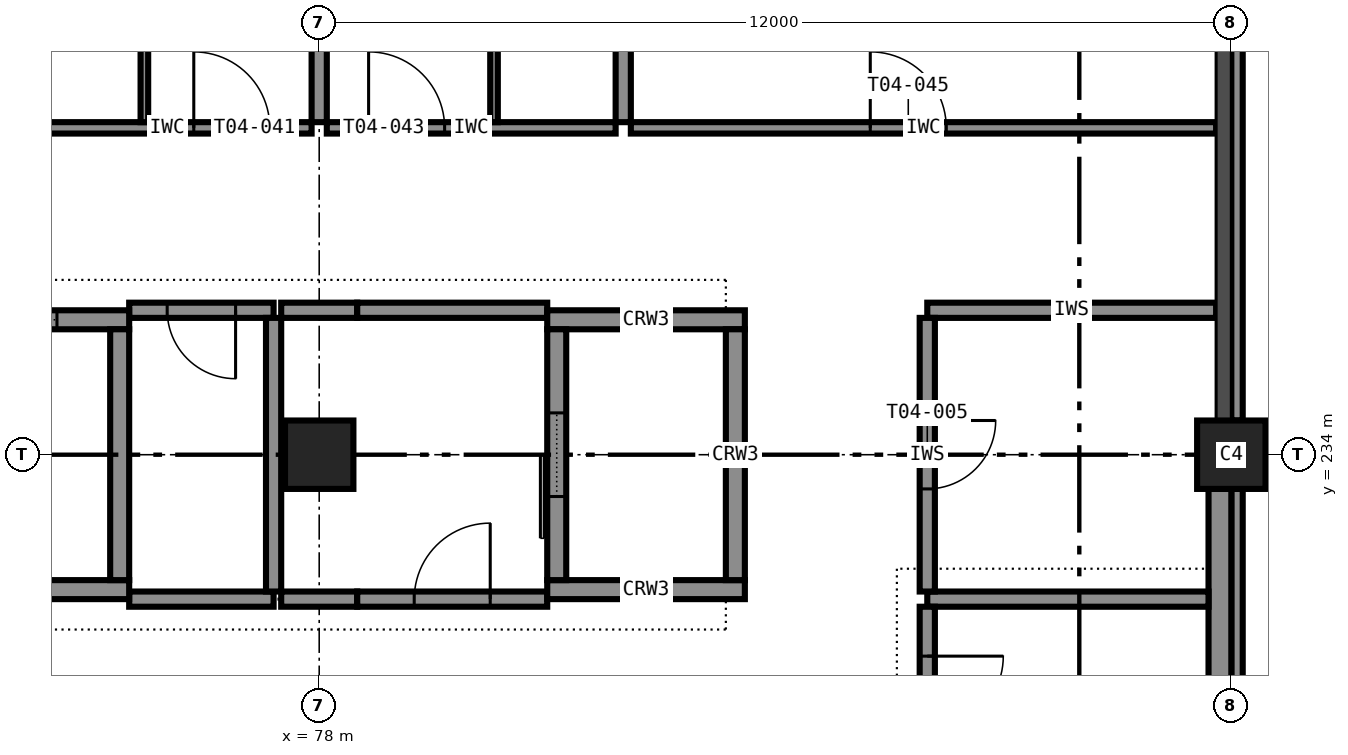
"""IFC4 building model, lengths in metres.
Left out: names, types, materials, properties, quantities, classifications, styles, units other than length and angle.
Written with IfcOpenShell. Run it as: python <this file> out.ifc"""

import sys

from ifc_helpers import new_model, si_unit, direction, frame, frame_2d, origin, origin_2d, place, context, subcontext, project, spatial, rectangle, extrude, element, fill, save


model = new_model("IFC4")
c1 = context("Model", 3, precision=1e-05, world=origin(), true_north=direction((0.0, 1.0)))
c2 = subcontext(c1, "Body", "Model", "MODEL_VIEW")
j1 = project(units=[si_unit("LENGTHUNIT", "METRE"), si_unit("PLANEANGLEUNIT", "RADIAN")], contexts=[c1])
p1 = place(None, origin())
s1 = spatial("IfcSite", under=j1, at=p1, CompositionType="ELEMENT")
p2 = place(p1, origin())
s2 = spatial("IfcBuilding", under=s1, at=p2, CompositionType="ELEMENT")
p3 = place(p2, frame((0.0, 0.0, 21.0)))
s3 = spatial("IfcBuildingStorey", under=s2, at=p3, CompositionType="ELEMENT", Elevation=21.0)
for number, where, z_axis, x_axis in (
    (1, (78.0, 234.0, 0.0), (0.0, 0.0, 1.0), (1.0, 0.0, 0.0)),
    (2, (90.0, 234.0, 0.0), (0.0, 0.0, 1.0), (1.0, 0.0, 0.0)),
):
    element("IfcColumn", number, at=place(p3, frame(where, z_axis=z_axis, x_axis=x_axis)), inside=s3, PredefinedType="COLUMN", context=c2, shape_type="SweptSolid", body=[
        extrude(rectangle(XDim=0.9, YDim=0.9, at=origin_2d()), origin(), (0.0, 0.0, 1.0), 3.6),
    ])
p4 = place(p3, frame((72.5, 232.225, 0.0), z_axis=(0.0, 0.0, 1.0), x_axis=(1.0, 0.0, 0.0)))
e3 = element("IfcWall", 3, at=p4, inside=s3, PredefinedType="SHEAR", context=c2, shape_type="SweptSolid", body=[
    extrude(rectangle(XDim=3.0, YDim=0.25, at=frame_2d((1.5, 0.0))), origin(), (0.0, 0.0, 1.0), 3.6),
])
p5 = place(p3, frame((72.5, 235.775, 0.0), z_axis=(0.0, 0.0, 1.0), x_axis=(1.0, 0.0, 0.0)))
e4 = element("IfcWall", 4, at=p5, inside=s3, PredefinedType="SHEAR", context=c2, shape_type="SweptSolid", body=[
    extrude(rectangle(XDim=3.0, YDim=0.25, at=frame_2d((1.5, 0.0))), origin(), (0.0, 0.0, 1.0), 3.6),
])
p6 = place(p5, frame((0.95, 0.0, 0.0)))
e5 = element("IfcOpeningElement", 5, at=p6, cuts=e4, PredefinedType="OPENING", context=c2, shape_type="SweptSolid", body=[
    extrude(rectangle(XDim=1.1, YDim=2.1, at=frame_2d((0.55, 1.05))), frame((0.0, 0.135, 0.0), z_axis=(0.0, -1.0, 0.0), x_axis=(1.0, 0.0, 0.0)), (0.0, 0.0, 1.0), 0.27),
])
p7 = place(p3, frame((75.375, 232.35, 0.0), z_axis=(0.0, 0.0, 1.0), x_axis=(0.0, 1.0, 0.0)))
e6 = element("IfcWall", 6, at=p7, inside=s3, PredefinedType="SHEAR", context=c2, shape_type="SweptSolid", body=[
    extrude(rectangle(XDim=3.3, YDim=0.25, at=frame_2d((1.65, 0.0))), origin(), (0.0, 0.0, 1.0), 3.6),
])
for number, where, z_axis, x_axis in (
    (7, (81.0, 232.225, 0.0), (0.0, 0.0, 1.0), (1.0, 0.0, 0.0)),
    (8, (81.0, 235.775, 0.0), (0.0, 0.0, 1.0), (1.0, 0.0, 0.0)),
):
    element("IfcWall", number, at=place(p3, frame(where, z_axis=z_axis, x_axis=x_axis)), inside=s3, PredefinedType="SHEAR", context=c2, shape_type="SweptSolid", body=[
        extrude(rectangle(XDim=2.6, YDim=0.25, at=frame_2d((1.3, 0.0))), origin(), (0.0, 0.0, 1.0), 3.6),
    ])
p8 = place(p3, frame((81.125, 232.35, 0.0), z_axis=(0.0, 0.0, 1.0), x_axis=(0.0, 1.0, 0.0)))
e9 = element("IfcWall", 9, at=p8, inside=s3, PredefinedType="SHEAR", context=c2, shape_type="SweptSolid", body=[
    extrude(rectangle(XDim=3.3, YDim=0.25, at=frame_2d((1.65, 0.0))), origin(), (0.0, 0.0, 1.0), 3.6),
])
p9 = place(p8, frame((1.1, 0.0, 0.0)))
e10 = element("IfcOpeningElement", 10, at=p9, cuts=e9, PredefinedType="OPENING", context=c2, shape_type="SweptSolid", body=[
    extrude(rectangle(XDim=1.1, YDim=2.1, at=frame_2d((0.55, 1.05))), frame((0.0, 0.135, 0.0), z_axis=(0.0, -1.0, 0.0), x_axis=(1.0, 0.0, 0.0)), (0.0, 0.0, 1.0), 0.27),
])
p10 = place(p3, frame((83.475, 232.35, 0.0), z_axis=(0.0, 0.0, 1.0), x_axis=(0.0, 1.0, 0.0)))
e11 = element("IfcWall", 11, at=p10, inside=s3, PredefinedType="SHEAR", context=c2, shape_type="SweptSolid", body=[
    extrude(rectangle(XDim=3.3, YDim=0.25, at=frame_2d((1.65, 0.0))), origin(), (0.0, 0.0, 1.0), 3.6),
])
p11 = place(p3, frame((89.85, 222.45, 0.0), z_axis=(0.0, 0.0, 1.0), x_axis=(0.0, 1.0, 0.0)))
e12 = element("IfcWall", 12, at=p11, inside=s3, PredefinedType="STANDARD", context=c2, shape_type="SweptSolid", body=[
    extrude(rectangle(XDim=11.1, YDim=0.3, at=frame_2d((5.55, 0.0))), origin(), (0.0, 0.0, 1.0), 2.6),
])
for number, where, z_axis, x_axis in (
    (13, (90.075, 222.45, 3.4), (0.0, 0.0, 1.0), (0.0, 1.0, 0.0)),
    (14, (90.075, 234.45, 3.4), (0.0, 0.0, 1.0), (0.0, 1.0, 0.0)),
):
    element("IfcWall", number, at=place(p3, frame(where, z_axis=z_axis, x_axis=x_axis)), inside=s3, PredefinedType="STANDARD", context=c2, shape_type="SweptSolid", body=[
        extrude(rectangle(XDim=11.1, YDim=0.15, at=frame_2d((5.55, 0.0))), origin(), (0.0, 0.0, 1.0), 0.2),
    ])
p12 = place(p3, frame((75.5, 232.1, 0.0), z_axis=(0.0, 0.0, 1.0), x_axis=(1.0, 0.0, 0.0)))
e15 = element("IfcWall", 15, at=p12, inside=s3, PredefinedType="PARTITIONING", context=c2, shape_type="SweptSolid", body=[
    extrude(rectangle(XDim=1.9, YDim=0.2, at=frame_2d((0.95, 0.0))), origin(), (0.0, 0.0, 1.0), 3.4),
])
p13 = place(p3, frame((77.5, 232.1, 0.0), z_axis=(0.0, 0.0, 1.0), x_axis=(1.0, 0.0, 0.0)))
e16 = element("IfcWall", 16, at=p13, inside=s3, PredefinedType="PARTITIONING", context=c2, shape_type="SweptSolid", body=[
    extrude(rectangle(XDim=1.0, YDim=0.2, at=frame_2d((0.5, 0.0))), origin(), (0.0, 0.0, 1.0), 3.4),
])
p14 = place(p3, frame((78.5, 232.1, 0.0), z_axis=(0.0, 0.0, 1.0), x_axis=(1.0, 0.0, 0.0)))
e17 = element("IfcWall", 17, at=p14, inside=s3, PredefinedType="PARTITIONING", context=c2, shape_type="SweptSolid", body=[
    extrude(rectangle(XDim=2.5, YDim=0.2, at=frame_2d((1.25, 0.0))), origin(), (0.0, 0.0, 1.0), 3.4),
])
p15 = place(p14, frame((0.75, 0.0, 0.0)))
e18 = element("IfcOpeningElement", 18, at=p15, cuts=e17, PredefinedType="OPENING", context=c2, shape_type="SweptSolid", body=[
    extrude(rectangle(XDim=1.0, YDim=2.1, at=frame_2d((0.5, 1.05))), frame((0.0, 0.11, 0.0), z_axis=(0.0, -1.0, 0.0), x_axis=(1.0, 0.0, 0.0)), (0.0, 0.0, 1.0), 0.22),
])
p16 = place(p3, frame((86.0, 232.1, 0.0), z_axis=(0.0, 0.0, 1.0), x_axis=(1.0, 0.0, 0.0)))
e19 = element("IfcWall", 19, at=p16, inside=s3, PredefinedType="PARTITIONING", context=c2, shape_type="SweptSolid", body=[
    extrude(rectangle(XDim=3.7, YDim=0.2, at=frame_2d((1.85, 0.0))), origin(), (0.0, 0.0, 1.0), 3.4),
])
p17 = place(p3, frame((77.4, 235.9, 0.0), z_axis=(0.0, 0.0, 1.0), x_axis=(-1.0, 0.0, 0.0)))
e20 = element("IfcWall", 20, at=p17, inside=s3, PredefinedType="PARTITIONING", context=c2, shape_type="SweptSolid", body=[
    extrude(rectangle(XDim=1.9, YDim=0.2, at=frame_2d((0.95, 0.0))), origin(), (0.0, 0.0, 1.0), 3.4),
])
p18 = place(p17, frame((0.5, 0.0, 0.0)))
e21 = element("IfcOpeningElement", 21, at=p18, cuts=e20, PredefinedType="OPENING", context=c2, shape_type="SweptSolid", body=[
    extrude(rectangle(XDim=0.9, YDim=2.1, at=frame_2d((0.45, 1.05))), frame((0.0, 0.11, 0.0), z_axis=(0.0, -1.0, 0.0), x_axis=(1.0, 0.0, 0.0)), (0.0, 0.0, 1.0), 0.22),
])
p19 = place(p3, frame((77.5, 235.9, 0.0), z_axis=(0.0, 0.0, 1.0), x_axis=(1.0, 0.0, 0.0)))
e22 = element("IfcWall", 22, at=p19, inside=s3, PredefinedType="PARTITIONING", context=c2, shape_type="SweptSolid", body=[
    extrude(rectangle(XDim=1.0, YDim=0.2, at=frame_2d((0.5, 0.0))), origin(), (0.0, 0.0, 1.0), 3.4),
])
p20 = place(p3, frame((78.5, 235.9, 0.0), z_axis=(0.0, 0.0, 1.0), x_axis=(1.0, 0.0, 0.0)))
e23 = element("IfcWall", 23, at=p20, inside=s3, PredefinedType="PARTITIONING", context=c2, shape_type="SweptSolid", body=[
    extrude(rectangle(XDim=2.5, YDim=0.2, at=frame_2d((1.25, 0.0))), origin(), (0.0, 0.0, 1.0), 3.4),
])
p21 = place(p3, frame((86.0, 235.9, 0.0), z_axis=(0.0, 0.0, 1.0), x_axis=(1.0, 0.0, 0.0)))
e24 = element("IfcWall", 24, at=p21, inside=s3, PredefinedType="PARTITIONING", context=c2, shape_type="SweptSolid", body=[
    extrude(rectangle(XDim=3.8, YDim=0.2, at=frame_2d((1.9, 0.0))), origin(), (0.0, 0.0, 1.0), 3.4),
])
p22 = place(p3, frame((77.4, 232.2, 0.0), z_axis=(0.0, 0.0, 1.0), x_axis=(0.0, 1.0, 0.0)))
e25 = element("IfcWall", 25, at=p22, inside=s3, PredefinedType="PARTITIONING", context=c2, shape_type="SweptSolid", body=[
    extrude(rectangle(XDim=3.6, YDim=0.2, at=frame_2d((1.8, 0.0))), origin(), (0.0, 0.0, 1.0), 3.4),
])
p23 = place(p3, frame((86.0, 235.8, 0.0), z_axis=(0.0, 0.0, 1.0), x_axis=(0.0, -1.0, 0.0)))
e26 = element("IfcWall", 26, at=p23, inside=s3, PredefinedType="PARTITIONING", context=c2, shape_type="SweptSolid", body=[
    extrude(rectangle(XDim=3.6, YDim=0.2, at=frame_2d((1.8, 0.0))), origin(), (0.0, 0.0, 1.0), 3.4),
])
p24 = place(p23, frame((1.35, 0.0, 0.0)))
e27 = element("IfcOpeningElement", 27, at=p24, cuts=e26, PredefinedType="OPENING", context=c2, shape_type="SweptSolid", body=[
    extrude(rectangle(XDim=0.9, YDim=2.1, at=frame_2d((0.45, 1.05))), frame((0.0, 0.11, 0.0), z_axis=(0.0, -1.0, 0.0), x_axis=(1.0, 0.0, 0.0)), (0.0, 0.0, 1.0), 0.22),
])
p25 = place(p3, frame((86.0, 232.0, 0.0), z_axis=(0.0, 0.0, 1.0), x_axis=(0.0, -1.0, 0.0)))
e28 = element("IfcWall", 28, at=p25, inside=s3, PredefinedType="PARTITIONING", context=c2, shape_type="SweptSolid", body=[
    extrude(rectangle(XDim=2.3, YDim=0.2, at=frame_2d((1.15, 0.0))), origin(), (0.0, 0.0, 1.0), 3.4),
])
p26 = place(p25, frame((0.65, 0.0, 0.0)))
e29 = element("IfcOpeningElement", 29, at=p26, cuts=e28, PredefinedType="OPENING", context=c2, shape_type="SweptSolid", body=[
    extrude(rectangle(XDim=1.0, YDim=2.1, at=frame_2d((0.5, 1.05))), frame((0.0, 0.11, 0.0), z_axis=(0.0, -1.0, 0.0), x_axis=(1.0, 0.0, 0.0)), (0.0, 0.0, 1.0), 0.22),
])
p27 = place(p3, frame((74.1, 238.3, 0.0), z_axis=(0.0, 0.0, 1.0), x_axis=(1.0, 0.0, 0.0)))
e30 = element("IfcWall", 30, at=p27, inside=s3, PredefinedType="PARTITIONING", context=c2, shape_type="SweptSolid", body=[
    extrude(rectangle(XDim=3.8, YDim=0.15, at=frame_2d((1.9, 0.0))), origin(), (0.0, 0.0, 1.0), 3.4),
])
p28 = place(p27, frame((2.25, 0.0, 0.0)))
e31 = element("IfcOpeningElement", 31, at=p28, cuts=e30, PredefinedType="OPENING", context=c2, shape_type="SweptSolid", body=[
    extrude(rectangle(XDim=1.0, YDim=2.1, at=frame_2d((0.5, 1.05))), frame((0.0, 0.085, 0.0), z_axis=(0.0, -1.0, 0.0), x_axis=(1.0, 0.0, 0.0)), (0.0, 0.0, 1.0), 0.17),
])
p29 = place(p3, frame((75.7, 241.25, 0.0), z_axis=(0.0, 0.0, 1.0), x_axis=(0.0, -1.0, 0.0)))
e32 = element("IfcWall", 32, at=p29, inside=s3, PredefinedType="PARTITIONING", context=c2, shape_type="SweptSolid", body=[
    extrude(rectangle(XDim=2.875, YDim=0.1, at=frame_2d((1.438, 0.0))), origin(), (0.0, 0.0, 1.0), 3.4),
])
p30 = place(p29, frame((1.038, 0.0, 0.0)))
e33 = element("IfcOpeningElement", 33, at=p30, cuts=e32, PredefinedType="OPENING", context=c2, shape_type="SweptSolid", body=[
    extrude(rectangle(XDim=0.8, YDim=2.1, at=frame_2d((0.4, 1.05))), frame((0.0, 0.06, 0.0), z_axis=(0.0, -1.0, 0.0), x_axis=(1.0, 0.0, 0.0)), (0.0, 0.0, 1.0), 0.12),
])
p31 = place(p3, frame((78.1, 238.3, 0.0), z_axis=(0.0, 0.0, 1.0), x_axis=(1.0, 0.0, 0.0)))
e34 = element("IfcWall", 34, at=p31, inside=s3, PredefinedType="PARTITIONING", context=c2, shape_type="SweptSolid", body=[
    extrude(rectangle(XDim=3.8, YDim=0.15, at=frame_2d((1.9, 0.0))), origin(), (0.0, 0.0, 1.0), 3.4),
])
p32 = place(p31, frame((0.55, 0.0, 0.0)))
e35 = element("IfcOpeningElement", 35, at=p32, cuts=e34, PredefinedType="OPENING", context=c2, shape_type="SweptSolid", body=[
    extrude(rectangle(XDim=1.0, YDim=2.1, at=frame_2d((0.5, 1.05))), frame((0.0, 0.085, 0.0), z_axis=(0.0, -1.0, 0.0), x_axis=(1.0, 0.0, 0.0)), (0.0, 0.0, 1.0), 0.17),
])
p33 = place(p3, frame((80.3, 238.375, 0.0), z_axis=(0.0, 0.0, 1.0), x_axis=(0.0, 1.0, 0.0)))
e36 = element("IfcWall", 36, at=p33, inside=s3, PredefinedType="PARTITIONING", context=c2, shape_type="SweptSolid", body=[
    extrude(rectangle(XDim=2.875, YDim=0.1, at=frame_2d((1.438, 0.0))), origin(), (0.0, 0.0, 1.0), 3.4),
])
p34 = place(p33, frame((1.038, 0.0, 0.0)))
e37 = element("IfcOpeningElement", 37, at=p34, cuts=e36, PredefinedType="OPENING", context=c2, shape_type="SweptSolid", body=[
    extrude(rectangle(XDim=0.8, YDim=2.1, at=frame_2d((0.4, 1.05))), frame((0.0, 0.06, 0.0), z_axis=(0.0, -1.0, 0.0), x_axis=(1.0, 0.0, 0.0)), (0.0, 0.0, 1.0), 0.12),
])
p35 = place(p3, frame((82.1, 238.3, 0.0), z_axis=(0.0, 0.0, 1.0), x_axis=(1.0, 0.0, 0.0)))
e38 = element("IfcWall", 38, at=p35, inside=s3, PredefinedType="PARTITIONING", context=c2, shape_type="SweptSolid", body=[
    extrude(rectangle(XDim=7.7, YDim=0.15, at=frame_2d((3.85, 0.0))), origin(), (0.0, 0.0, 1.0), 3.4),
])
p36 = place(p35, frame((3.15, 0.0, 0.0)))
e39 = element("IfcOpeningElement", 39, at=p36, cuts=e38, PredefinedType="OPENING", context=c2, shape_type="SweptSolid", body=[
    extrude(rectangle(XDim=1.0, YDim=2.1, at=frame_2d((0.5, 1.05))), frame((0.0, 0.085, 0.0), z_axis=(0.0, -1.0, 0.0), x_axis=(1.0, 0.0, 0.0)), (0.0, 0.0, 1.0), 0.17),
])
p37 = place(p3, frame((78.0, 245.55, 0.0), z_axis=(0.0, 0.0, 1.0), x_axis=(0.0, -1.0, 0.0)))
e40 = element("IfcWall", 40, at=p37, inside=s3, PredefinedType="PARTITIONING", context=c2, shape_type="SweptSolid", body=[
    extrude(rectangle(XDim=7.175, YDim=0.2, at=frame_2d((3.587, 0.0))), origin(), (0.0, 0.0, 1.0), 2.6),
])
p38 = place(p3, frame((82.0, 245.7, 0.0), z_axis=(0.0, 0.0, 1.0), x_axis=(0.0, -1.0, 0.0)))
e41 = element("IfcWall", 41, at=p38, inside=s3, PredefinedType="PARTITIONING", context=c2, shape_type="SweptSolid", body=[
    extrude(rectangle(XDim=7.325, YDim=0.2, at=frame_2d((3.663, 0.0))), origin(), (0.0, 0.0, 1.0), 3.4),
])
p39 = place(p18, origin())
e42 = element("IfcDoor", 42, at=p39, inside=s3, OperationType="SINGLE_SWING_LEFT", PredefinedType="DOOR", context=c2, shape_type="SweptSolid", body=[
    extrude(rectangle(XDim=0.9, YDim=2.1, at=frame_2d((0.45, 1.05))), frame((0.0, 0.025, 0.0), z_axis=(0.0, -1.0, 0.0), x_axis=(1.0, 0.0, 0.0)), (0.0, 0.0, 1.0), 0.05),
])
fill(e21, e42)
p40 = place(p15, origin())
e43 = element("IfcDoor", 43, at=p40, inside=s3, OperationType="SINGLE_SWING_RIGHT", PredefinedType="DOOR", context=c2, shape_type="SweptSolid", body=[
    extrude(rectangle(XDim=1.0, YDim=2.1, at=frame_2d((0.5, 1.05))), frame((0.0, 0.025, 0.0), z_axis=(0.0, -1.0, 0.0), x_axis=(1.0, 0.0, 0.0)), (0.0, 0.0, 1.0), 0.05),
])
fill(e18, e43)
p41 = place(p24, origin())
e44 = element("IfcDoor", 44, at=p41, inside=s3, OperationType="SINGLE_SWING_LEFT", PredefinedType="DOOR", context=c2, shape_type="SweptSolid", body=[
    extrude(rectangle(XDim=0.9, YDim=2.1, at=frame_2d((0.45, 1.05))), frame((0.0, 0.025, 0.0), z_axis=(0.0, -1.0, 0.0), x_axis=(1.0, 0.0, 0.0)), (0.0, 0.0, 1.0), 0.05),
])
fill(e27, e44)
p42 = place(p26, origin())
e45 = element("IfcDoor", 45, at=p42, inside=s3, OperationType="SINGLE_SWING_LEFT", PredefinedType="DOOR", context=c2, shape_type="SweptSolid", body=[
    extrude(rectangle(XDim=1.0, YDim=2.1, at=frame_2d((0.5, 1.05))), frame((0.0, 0.025, 0.0), z_axis=(0.0, -1.0, 0.0), x_axis=(1.0, 0.0, 0.0)), (0.0, 0.0, 1.0), 0.05),
])
fill(e29, e45)
p43 = place(p28, origin())
e46 = element("IfcDoor", 46, at=p43, inside=s3, OperationType="SINGLE_SWING_LEFT", PredefinedType="DOOR", context=c2, shape_type="SweptSolid", body=[
    extrude(rectangle(XDim=1.0, YDim=2.1, at=frame_2d((0.5, 1.05))), frame((0.0, 0.025, 0.0), z_axis=(0.0, -1.0, 0.0), x_axis=(1.0, 0.0, 0.0)), (0.0, 0.0, 1.0), 0.05),
])
fill(e31, e46)
p44 = place(p32, origin())
e47 = element("IfcDoor", 47, at=p44, inside=s3, OperationType="SINGLE_SWING_LEFT", PredefinedType="DOOR", context=c2, shape_type="SweptSolid", body=[
    extrude(rectangle(XDim=1.0, YDim=2.1, at=frame_2d((0.5, 1.05))), frame((0.0, 0.025, 0.0), z_axis=(0.0, -1.0, 0.0), x_axis=(1.0, 0.0, 0.0)), (0.0, 0.0, 1.0), 0.05),
])
fill(e35, e47)
p45 = place(p36, origin())
e48 = element("IfcDoor", 48, at=p45, inside=s3, OperationType="SINGLE_SWING_LEFT", PredefinedType="DOOR", context=c2, shape_type="SweptSolid", body=[
    extrude(rectangle(XDim=1.0, YDim=2.1, at=frame_2d((0.5, 1.05))), frame((0.0, 0.025, 0.0), z_axis=(0.0, -1.0, 0.0), x_axis=(1.0, 0.0, 0.0)), (0.0, 0.0, 1.0), 0.05),
])
fill(e39, e48)
p46 = place(p6, origin())
e49 = element("IfcDoor", 49, at=p46, inside=s3, OperationType="SLIDING_TO_LEFT", PredefinedType="DOOR", context=c2, shape_type="SweptSolid", body=[
    extrude(rectangle(XDim=1.1, YDim=2.1, at=frame_2d((0.55, 1.05))), frame((0.0, 0.025, 0.0), z_axis=(0.0, -1.0, 0.0), x_axis=(1.0, 0.0, 0.0)), (0.0, 0.0, 1.0), 0.05),
])
fill(e5, e49)
p47 = place(p9, origin())
e50 = element("IfcDoor", 50, at=p47, inside=s3, OperationType="SLIDING_TO_LEFT", PredefinedType="DOOR", context=c2, shape_type="SweptSolid", body=[
    extrude(rectangle(XDim=1.1, YDim=2.1, at=frame_2d((0.55, 1.05))), frame((0.0, 0.025, 0.0), z_axis=(0.0, -1.0, 0.0), x_axis=(1.0, 0.0, 0.0)), (0.0, 0.0, 1.0), 0.05),
])
fill(e10, e50)
save(model, sys.argv[1])
